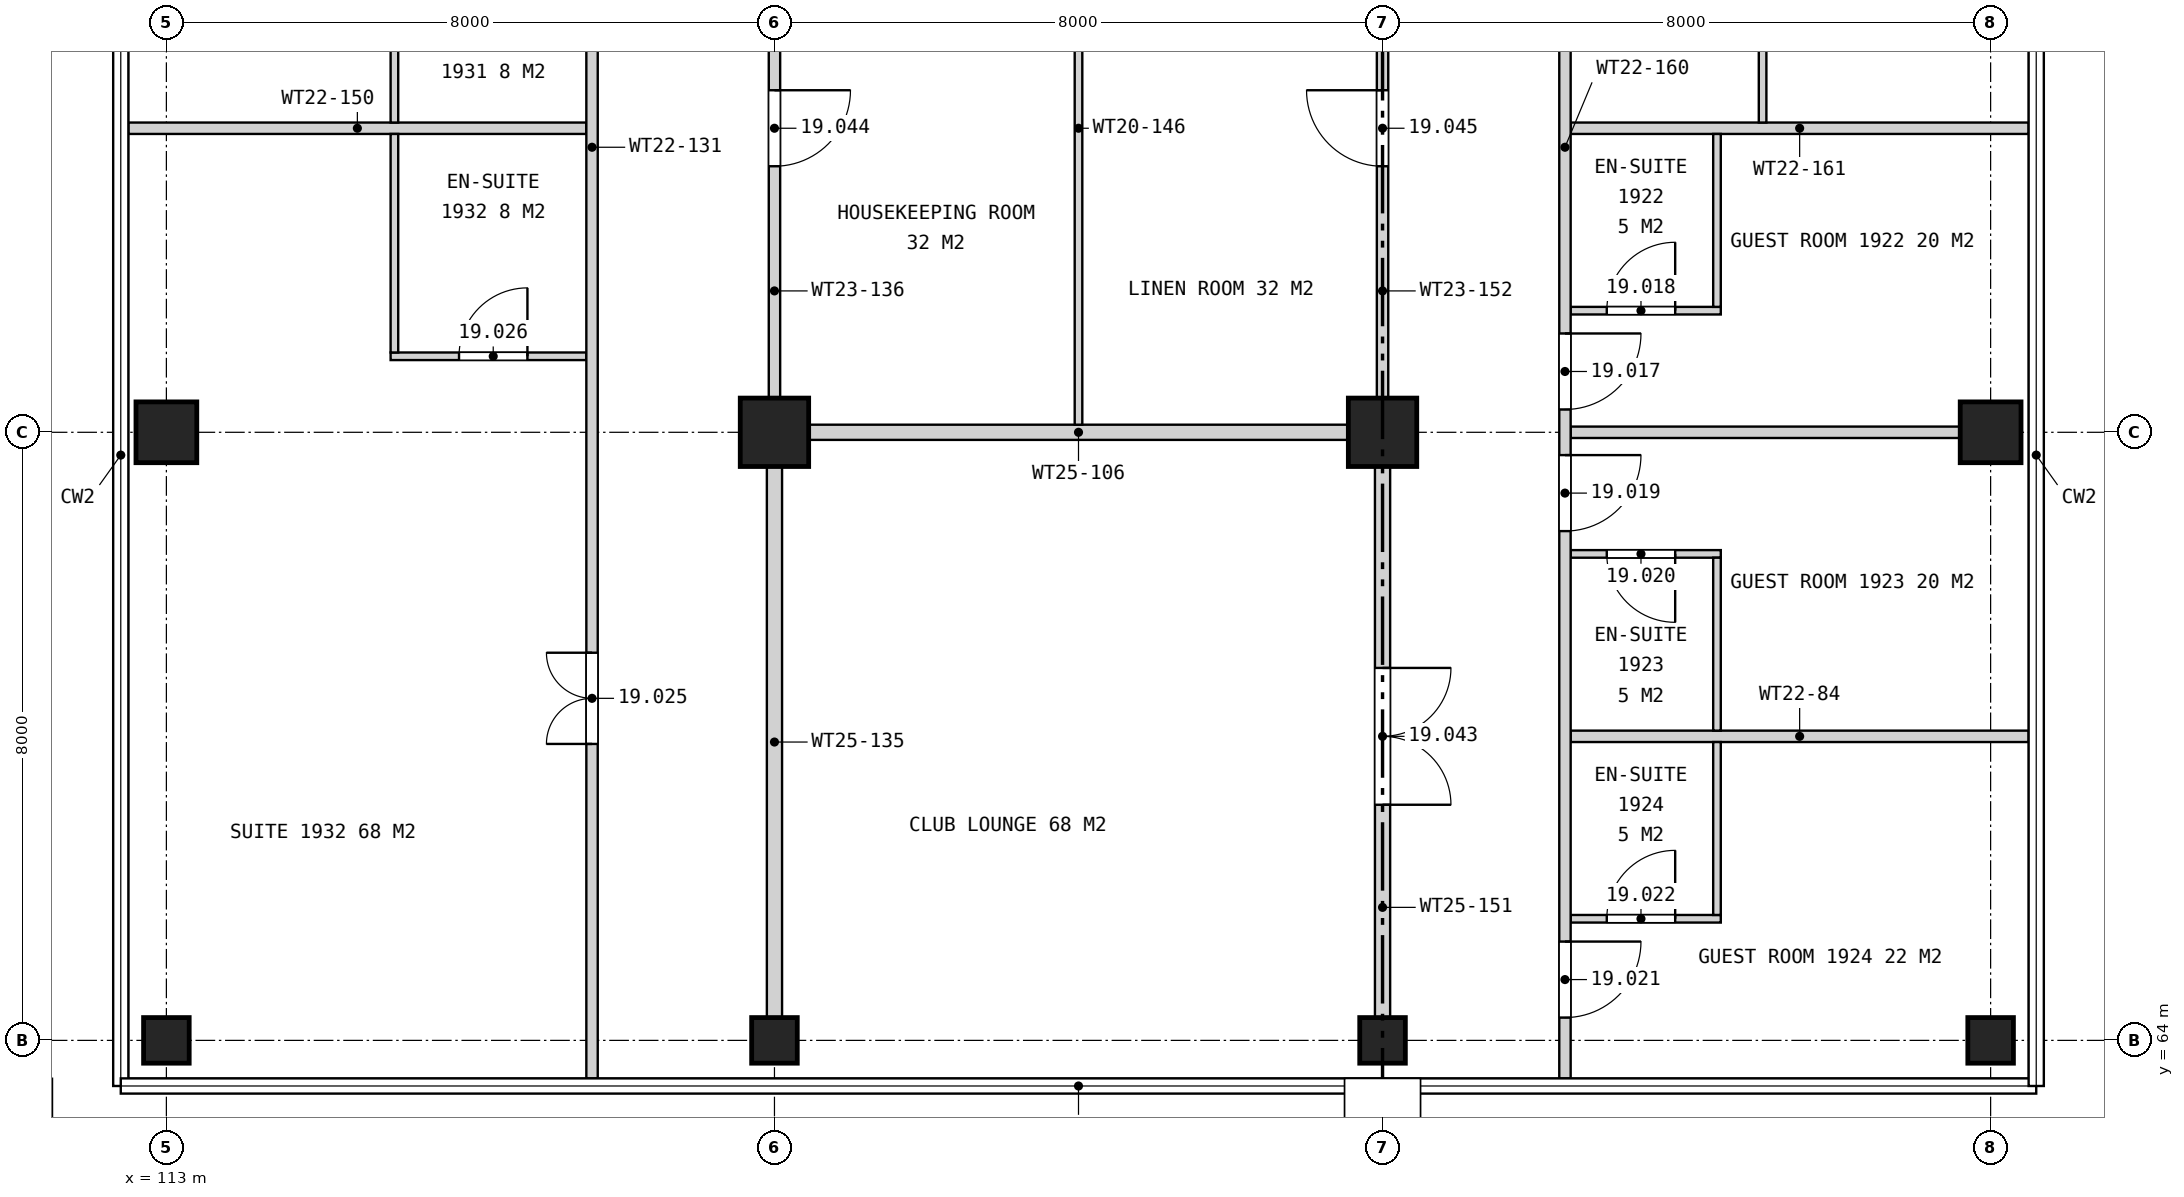
"""IFC4 building model, lengths in metres.
Left out: names, types, materials, properties, quantities, classifications, styles, units other than length and angle.
Written with IfcOpenShell. Run it as: python <this file> out.ifc"""

import sys

from ifc_helpers import new_model, si_unit, direction, frame, frame_2d, origin, origin_2d, place, context, subcontext, project, spatial, rectangle, extrude, element, fill, save


model = new_model("IFC4")
c1 = context("Model", 3, precision=1e-05, world=origin(), true_north=direction((0.0, 1.0)))
c2 = subcontext(c1, "Body", "Model", "MODEL_VIEW")
j1 = project(units=[si_unit("LENGTHUNIT", "METRE"), si_unit("PLANEANGLEUNIT", "RADIAN")], contexts=[c1])
p1 = place(None, origin())
s1 = spatial("IfcSite", under=j1, at=p1, CompositionType="ELEMENT")
p2 = place(p1, origin())
s2 = spatial("IfcBuilding", under=s1, at=p2, CompositionType="ELEMENT")
p3 = place(p2, frame((0.0, 0.0, 97.9)))
s3 = spatial("IfcBuildingStorey", under=s2, at=p3, CompositionType="ELEMENT", Elevation=97.9)
p4 = place(p3, frame((113.0, 64.0, 0.0), z_axis=(0.0, 0.0, 1.0), x_axis=(1.0, 0.0, 0.0)))
e1 = element("IfcColumn", 1, at=p4, inside=s3, PredefinedType="COLUMN", context=c2, shape_type="SweptSolid", body=[
    extrude(rectangle(XDim=0.6, YDim=0.6, at=origin_2d()), origin(), (0.0, 0.0, 1.0), 3.7),
])
p5 = place(p3, frame((113.0, 72.0, 0.0), z_axis=(0.0, 0.0, 1.0), x_axis=(1.0, 0.0, 0.0)))
e2 = element("IfcColumn", 2, at=p5, inside=s3, PredefinedType="COLUMN", context=c2, shape_type="SweptSolid", body=[
    extrude(rectangle(XDim=0.8, YDim=0.8, at=origin_2d()), origin(), (0.0, 0.0, 1.0), 3.7),
])
p6 = place(p3, frame((121.0, 64.0, 0.0), z_axis=(0.0, 0.0, 1.0), x_axis=(1.0, 0.0, 0.0)))
e3 = element("IfcColumn", 3, at=p6, inside=s3, PredefinedType="COLUMN", context=c2, shape_type="SweptSolid", body=[
    extrude(rectangle(XDim=0.6, YDim=0.6, at=origin_2d()), origin(), (0.0, 0.0, 1.0), 3.7),
])
p7 = place(p3, frame((121.0, 72.0, 0.0), z_axis=(0.0, 0.0, 1.0), x_axis=(1.0, 0.0, 0.0)))
e4 = element("IfcColumn", 4, at=p7, inside=s3, PredefinedType="COLUMN", context=c2, shape_type="SweptSolid", body=[
    extrude(rectangle(XDim=0.9, YDim=0.9, at=origin_2d()), origin(), (0.0, 0.0, 1.0), 3.7),
])
p8 = place(p3, frame((129.0, 64.0, 0.0), z_axis=(0.0, 0.0, 1.0), x_axis=(1.0, 0.0, 0.0)))
e5 = element("IfcColumn", 5, at=p8, inside=s3, PredefinedType="COLUMN", context=c2, shape_type="SweptSolid", body=[
    extrude(rectangle(XDim=0.6, YDim=0.6, at=origin_2d()), origin(), (0.0, 0.0, 1.0), 3.7),
])
p9 = place(p3, frame((129.0, 72.0, 0.0), z_axis=(0.0, 0.0, 1.0), x_axis=(1.0, 0.0, 0.0)))
e6 = element("IfcColumn", 6, at=p9, inside=s3, PredefinedType="COLUMN", context=c2, shape_type="SweptSolid", body=[
    extrude(rectangle(XDim=0.9, YDim=0.9, at=origin_2d()), origin(), (0.0, 0.0, 1.0), 3.7),
])
p10 = place(p3, frame((137.0, 64.0, 0.0), z_axis=(0.0, 0.0, 1.0), x_axis=(1.0, 0.0, 0.0)))
e7 = element("IfcColumn", 7, at=p10, inside=s3, PredefinedType="COLUMN", context=c2, shape_type="SweptSolid", body=[
    extrude(rectangle(XDim=0.6, YDim=0.6, at=origin_2d()), origin(), (0.0, 0.0, 1.0), 3.7),
])
p11 = place(p3, frame((137.0, 72.0, 0.0), z_axis=(0.0, 0.0, 1.0), x_axis=(1.0, 0.0, 0.0)))
e8 = element("IfcColumn", 8, at=p11, inside=s3, PredefinedType="COLUMN", context=c2, shape_type="SweptSolid", body=[
    extrude(rectangle(XDim=0.8, YDim=0.8, at=origin_2d()), origin(), (0.0, 0.0, 1.0), 3.7),
])
p12 = place(p3, frame((131.475, 65.6, 0.0), z_axis=(0.0, 0.0, 1.0), x_axis=(1.0, 0.0, 0.0)))
e9 = element("IfcWall", 9, at=p12, inside=s3, PredefinedType="PLUMBINGWALL", context=c2, shape_type="SweptSolid", body=[
    extrude(rectangle(XDim=1.975, YDim=0.1, at=frame_2d((0.987, 0.0))), origin(), (0.0, 0.0, 1.0), 3.7),
])
p13 = place(p12, frame((0.475, 0.0, 0.0)))
e10 = element("IfcOpeningElement", 10, at=p13, cuts=e9, PredefinedType="OPENING", context=c2, shape_type="SweptSolid", body=[
    extrude(rectangle(XDim=0.9, YDim=2.1, at=frame_2d((0.45, 1.05))), frame((0.0, 0.06, 0.0), z_axis=(0.0, -1.0, 0.0), x_axis=(1.0, 0.0, 0.0)), (0.0, 0.0, 1.0), 0.12),
])
p14 = place(p3, frame((131.475, 68.0, 0.0), z_axis=(0.0, 0.0, 1.0), x_axis=(1.0, 0.0, 0.0)))
e11 = element("IfcWall", 11, at=p14, inside=s3, PredefinedType="PARTITIONING", context=c2, shape_type="SweptSolid", body=[
    extrude(rectangle(XDim=6.025, YDim=0.15, at=frame_2d((3.012, 0.0))), origin(), (0.0, 0.0, 1.0), 2.963),
])
p15 = place(p3, frame((131.475, 70.4, 0.0), z_axis=(0.0, 0.0, 1.0), x_axis=(1.0, 0.0, 0.0)))
e12 = element("IfcWall", 12, at=p15, inside=s3, PredefinedType="PLUMBINGWALL", context=c2, shape_type="SweptSolid", body=[
    extrude(rectangle(XDim=1.975, YDim=0.1, at=frame_2d((0.987, 0.0))), origin(), (0.0, 0.0, 1.0), 3.7),
])
p16 = place(p15, frame((0.475, 0.0, 0.0)))
e13 = element("IfcOpeningElement", 13, at=p16, cuts=e12, PredefinedType="OPENING", context=c2, shape_type="SweptSolid", body=[
    extrude(rectangle(XDim=0.9, YDim=2.1, at=frame_2d((0.45, 1.05))), frame((0.0, 0.06, 0.0), z_axis=(0.0, -1.0, 0.0), x_axis=(1.0, 0.0, 0.0)), (0.0, 0.0, 1.0), 0.12),
])
p17 = place(p3, frame((121.45, 72.0, 0.0), z_axis=(0.0, 0.0, 1.0), x_axis=(1.0, 0.0, 0.0)))
e14 = element("IfcWall", 14, at=p17, inside=s3, PredefinedType="PARTITIONING", context=c2, shape_type="SweptSolid", body=[
    extrude(rectangle(XDim=7.1, YDim=0.2, at=frame_2d((3.55, 0.0))), origin(), (0.0, 0.0, 1.0), 2.96),
])
p18 = place(p3, frame((131.475, 72.0, 0.0), z_axis=(0.0, 0.0, 1.0), x_axis=(1.0, 0.0, 0.0)))
e15 = element("IfcWall", 15, at=p18, inside=s3, PredefinedType="PARTITIONING", context=c2, shape_type="SweptSolid", body=[
    extrude(rectangle(XDim=5.125, YDim=0.15, at=frame_2d((2.562, 0.0))), origin(), (0.0, 0.0, 1.0), 2.96),
])
p19 = place(p3, frame((115.95, 73.0, 0.0), z_axis=(0.0, 0.0, 1.0), x_axis=(1.0, 0.0, 0.0)))
e16 = element("IfcWall", 16, at=p19, inside=s3, PredefinedType="PLUMBINGWALL", context=c2, shape_type="SweptSolid", body=[
    extrude(rectangle(XDim=2.575, YDim=0.1, at=frame_2d((1.288, 0.0))), origin(), (0.0, 0.0, 1.0), 3.7),
])
p20 = place(p19, frame((0.9, 0.0, 0.0)))
e17 = element("IfcOpeningElement", 17, at=p20, cuts=e16, PredefinedType="OPENING", context=c2, shape_type="SweptSolid", body=[
    extrude(rectangle(XDim=0.9, YDim=2.1, at=frame_2d((0.45, 1.05))), frame((0.0, 0.06, 0.0), z_axis=(0.0, -1.0, 0.0), x_axis=(1.0, 0.0, 0.0)), (0.0, 0.0, 1.0), 0.12),
])
p21 = place(p3, frame((131.475, 73.6, 0.0), z_axis=(0.0, 0.0, 1.0), x_axis=(1.0, 0.0, 0.0)))
e18 = element("IfcWall", 18, at=p21, inside=s3, PredefinedType="PLUMBINGWALL", context=c2, shape_type="SweptSolid", body=[
    extrude(rectangle(XDim=1.975, YDim=0.1, at=frame_2d((0.987, 0.0))), origin(), (0.0, 0.0, 1.0), 3.7),
])
p22 = place(p21, frame((0.475, 0.0, 0.0)))
e19 = element("IfcOpeningElement", 19, at=p22, cuts=e18, PredefinedType="OPENING", context=c2, shape_type="SweptSolid", body=[
    extrude(rectangle(XDim=0.9, YDim=2.1, at=frame_2d((0.45, 1.05))), frame((0.0, 0.06, 0.0), z_axis=(0.0, -1.0, 0.0), x_axis=(1.0, 0.0, 0.0)), (0.0, 0.0, 1.0), 0.12),
])
for number, where, z_axis, x_axis in (
    (20, (112.5, 76.0, 0.0), (0.0, 0.0, 1.0), (1.0, 0.0, 0.0)),
    (21, (131.475, 76.0, 0.0), (0.0, 0.0, 1.0), (1.0, 0.0, 0.0)),
):
    element("IfcWall", number, at=place(p3, frame(where, z_axis=z_axis, x_axis=x_axis)), inside=s3, PredefinedType="PARTITIONING", context=c2, shape_type="SweptSolid", body=[
        extrude(rectangle(XDim=6.025, YDim=0.15, at=frame_2d((3.012, 0.0))), origin(), (0.0, 0.0, 1.0), 2.963),
    ])
for number, where, z_axis, x_axis in (
    (22, (116.0, 73.05, 0.0), (0.0, 0.0, 1.0), (0.0, 1.0, 0.0)),
    (23, (116.0, 76.075, 0.0), (0.0, 0.0, 1.0), (0.0, 1.0, 0.0)),
):
    element("IfcWall", number, at=place(p3, frame(where, z_axis=z_axis, x_axis=x_axis)), inside=s3, PredefinedType="PLUMBINGWALL", context=c2, shape_type="SweptSolid", body=[
        extrude(rectangle(XDim=2.875, YDim=0.1, at=frame_2d((1.438, 0.0))), origin(), (0.0, 0.0, 1.0), 3.7),
    ])
p23 = place(p3, frame((118.6, 63.5, 0.0), z_axis=(0.0, 0.0, 1.0), x_axis=(0.0, 1.0, 0.0)))
e24 = element("IfcWall", 24, at=p23, inside=s3, PredefinedType="PARTITIONING", context=c2, shape_type="SweptSolid", body=[
    extrude(rectangle(XDim=24.5, YDim=0.15, at=frame_2d((12.25, 0.0))), origin(), (0.0, 0.0, 1.0), 2.957),
])
p24 = place(p23, frame((19.4, 0.0, 0.0)))
e25 = element("IfcOpeningElement", 25, at=p24, cuts=e24, PredefinedType="OPENING", context=c2, shape_type="SweptSolid", body=[
    extrude(rectangle(XDim=1.2, YDim=2.2, at=frame_2d((0.6, 1.1))), frame((0.0, 0.085, 0.0), z_axis=(0.0, -1.0, 0.0), x_axis=(1.0, 0.0, 0.0)), (0.0, 0.0, 1.0), 0.17),
])
p25 = place(p23, frame((4.4, 0.0, 0.0)))
e26 = element("IfcOpeningElement", 26, at=p25, cuts=e24, PredefinedType="OPENING", context=c2, shape_type="SweptSolid", body=[
    extrude(rectangle(XDim=1.2, YDim=2.2, at=frame_2d((0.6, 1.1))), frame((0.0, 0.085, 0.0), z_axis=(0.0, -1.0, 0.0), x_axis=(1.0, 0.0, 0.0)), (0.0, 0.0, 1.0), 0.17),
])
p26 = place(p3, frame((121.0, 64.3, 0.0), z_axis=(0.0, 0.0, 1.0), x_axis=(0.0, 1.0, 0.0)))
e27 = element("IfcWall", 27, at=p26, inside=s3, PredefinedType="PARTITIONING", context=c2, shape_type="SweptSolid", body=[
    extrude(rectangle(XDim=7.25, YDim=0.2, at=frame_2d((3.625, 0.0))), origin(), (0.0, 0.0, 1.0), 2.96),
])
p27 = place(p3, frame((121.0, 72.45, 0.0), z_axis=(0.0, 0.0, 1.0), x_axis=(0.0, 1.0, 0.0)))
e28 = element("IfcWall", 28, at=p27, inside=s3, PredefinedType="PARTITIONING", context=c2, shape_type="SweptSolid", body=[
    extrude(rectangle(XDim=7.05, YDim=0.15, at=frame_2d((3.525, 0.0))), origin(), (0.0, 0.0, 1.0), 2.96),
])
p28 = place(p27, frame((3.05, 0.0, 0.0)))
e29 = element("IfcOpeningElement", 29, at=p28, cuts=e28, PredefinedType="OPENING", context=c2, shape_type="SweptSolid", body=[
    extrude(rectangle(XDim=1.0, YDim=2.1, at=frame_2d((0.5, 1.05))), frame((0.0, 0.085, 0.0), z_axis=(0.0, -1.0, 0.0), x_axis=(1.0, 0.0, 0.0)), (0.0, 0.0, 1.0), 0.17),
])
p29 = place(p3, frame((125.0, 72.1, 0.0), z_axis=(0.0, 0.0, 1.0), x_axis=(0.0, 1.0, 0.0)))
e30 = element("IfcWall", 30, at=p29, inside=s3, PredefinedType="PARTITIONING", context=c2, shape_type="SweptSolid", body=[
    extrude(rectangle(XDim=7.8, YDim=0.1, at=frame_2d((3.9, 0.0))), origin(), (0.0, 0.0, 1.0), 3.014),
])
p30 = place(p3, frame((129.0, 64.3, 0.0), z_axis=(0.0, 0.0, 1.0), x_axis=(0.0, 1.0, 0.0)))
e31 = element("IfcWall", 31, at=p30, inside=s3, PredefinedType="PARTITIONING", context=c2, shape_type="SweptSolid", body=[
    extrude(rectangle(XDim=7.25, YDim=0.2, at=frame_2d((3.625, 0.0))), origin(), (0.0, 0.0, 1.0), 2.96),
])
p31 = place(p30, frame((2.8, 0.0, 0.0)))
e32 = element("IfcOpeningElement", 32, at=p31, cuts=e31, PredefinedType="OPENING", context=c2, shape_type="SweptSolid", body=[
    extrude(rectangle(XDim=1.8, YDim=2.4, at=frame_2d((0.9, 1.2))), frame((0.0, 0.11, 0.0), z_axis=(0.0, -1.0, 0.0), x_axis=(1.0, 0.0, 0.0)), (0.0, 0.0, 1.0), 0.22),
])
p32 = place(p3, frame((129.0, 72.45, 0.0), z_axis=(0.0, 0.0, 1.0), x_axis=(0.0, 1.0, 0.0)))
e33 = element("IfcWall", 33, at=p32, inside=s3, PredefinedType="PARTITIONING", context=c2, shape_type="SweptSolid", body=[
    extrude(rectangle(XDim=7.05, YDim=0.15, at=frame_2d((3.525, 0.0))), origin(), (0.0, 0.0, 1.0), 2.96),
])
p33 = place(p32, frame((3.05, 0.0, 0.0)))
e34 = element("IfcOpeningElement", 34, at=p33, cuts=e33, PredefinedType="OPENING", context=c2, shape_type="SweptSolid", body=[
    extrude(rectangle(XDim=1.0, YDim=2.1, at=frame_2d((0.5, 1.05))), frame((0.0, 0.085, 0.0), z_axis=(0.0, -1.0, 0.0), x_axis=(1.0, 0.0, 0.0)), (0.0, 0.0, 1.0), 0.17),
])
p34 = place(p3, frame((131.4, 63.5, 0.0), z_axis=(0.0, 0.0, 1.0), x_axis=(0.0, 1.0, 0.0)))
e35 = element("IfcWall", 35, at=p34, inside=s3, PredefinedType="PARTITIONING", context=c2, shape_type="SweptSolid", body=[
    extrude(rectangle(XDim=24.5, YDim=0.15, at=frame_2d((12.25, 0.0))), origin(), (0.0, 0.0, 1.0), 2.957),
])
p35 = place(p34, frame((19.4, 0.0, 0.0)))
e36 = element("IfcOpeningElement", 36, at=p35, cuts=e35, PredefinedType="OPENING", context=c2, shape_type="SweptSolid", body=[
    extrude(rectangle(XDim=1.2, YDim=2.2, at=frame_2d((0.6, 1.1))), frame((0.0, 0.085, 0.0), z_axis=(0.0, -1.0, 0.0), x_axis=(1.0, 0.0, 0.0)), (0.0, 0.0, 1.0), 0.17),
])
p36 = place(p34, frame((8.8, 0.0, 0.0)))
e37 = element("IfcOpeningElement", 37, at=p36, cuts=e35, PredefinedType="OPENING", context=c2, shape_type="SweptSolid", body=[
    extrude(rectangle(XDim=1.0, YDim=2.1, at=frame_2d((0.5, 1.05))), frame((0.0, 0.085, 0.0), z_axis=(0.0, -1.0, 0.0), x_axis=(1.0, 0.0, 0.0)), (0.0, 0.0, 1.0), 0.17),
])
p37 = place(p34, frame((7.2, 0.0, 0.0)))
e38 = element("IfcOpeningElement", 38, at=p37, cuts=e35, PredefinedType="OPENING", context=c2, shape_type="SweptSolid", body=[
    extrude(rectangle(XDim=1.0, YDim=2.1, at=frame_2d((0.5, 1.05))), frame((0.0, 0.085, 0.0), z_axis=(0.0, -1.0, 0.0), x_axis=(1.0, 0.0, 0.0)), (0.0, 0.0, 1.0), 0.17),
])
p38 = place(p34, frame((0.8, 0.0, 0.0)))
e39 = element("IfcOpeningElement", 39, at=p38, cuts=e35, PredefinedType="OPENING", context=c2, shape_type="SweptSolid", body=[
    extrude(rectangle(XDim=1.0, YDim=2.1, at=frame_2d((0.5, 1.05))), frame((0.0, 0.085, 0.0), z_axis=(0.0, -1.0, 0.0), x_axis=(1.0, 0.0, 0.0)), (0.0, 0.0, 1.0), 0.17),
])
for number, where, z_axis, x_axis in (
    (40, (133.4, 65.65, 0.0), (0.0, 0.0, 1.0), (0.0, 1.0, 0.0)),
    (41, (133.4, 68.075, 0.0), (0.0, 0.0, 1.0), (0.0, 1.0, 0.0)),
    (42, (133.4, 73.65, 0.0), (0.0, 0.0, 1.0), (0.0, 1.0, 0.0)),
):
    element("IfcWall", number, at=place(p3, frame(where, z_axis=z_axis, x_axis=x_axis)), inside=s3, PredefinedType="PLUMBINGWALL", context=c2, shape_type="SweptSolid", body=[
        extrude(rectangle(XDim=2.275, YDim=0.1, at=frame_2d((1.138, 0.0))), origin(), (0.0, 0.0, 1.0), 3.7),
    ])
p39 = place(p3, frame((134.0, 76.075, 0.0), z_axis=(0.0, 0.0, 1.0), x_axis=(0.0, 1.0, 0.0)))
e43 = element("IfcWall", 43, at=p39, inside=s3, PredefinedType="PLUMBINGWALL", context=c2, shape_type="SweptSolid", body=[
    extrude(rectangle(XDim=2.875, YDim=0.1, at=frame_2d((1.438, 0.0))), origin(), (0.0, 0.0, 1.0), 3.7),
])
p40 = place(p36, frame((1.0, 0.0, 0.0), z_axis=(0.0, 0.0, 1.0), x_axis=(-1.0, 0.0, 0.0)))
e44 = element("IfcDoor", 44, at=p40, inside=s3, OperationType="SINGLE_SWING_LEFT", PredefinedType="DOOR", context=c2, shape_type="SweptSolid", body=[
    extrude(rectangle(XDim=1.0, YDim=2.1, at=frame_2d((0.5, 1.05))), frame((0.0, 0.025, 0.0), z_axis=(0.0, -1.0, 0.0), x_axis=(1.0, 0.0, 0.0)), (0.0, 0.0, 1.0), 0.05),
])
fill(e37, e44)
p41 = place(p22, origin())
e45 = element("IfcDoor", 45, at=p41, inside=s3, OperationType="SINGLE_SWING_RIGHT", PredefinedType="DOOR", context=c2, shape_type="SweptSolid", body=[
    extrude(rectangle(XDim=0.9, YDim=2.1, at=frame_2d((0.45, 1.05))), frame((0.0, 0.025, 0.0), z_axis=(0.0, -1.0, 0.0), x_axis=(1.0, 0.0, 0.0)), (0.0, 0.0, 1.0), 0.05),
])
fill(e19, e45)
p42 = place(p37, frame((1.0, 0.0, 0.0), z_axis=(0.0, 0.0, 1.0), x_axis=(-1.0, 0.0, 0.0)))
e46 = element("IfcDoor", 46, at=p42, inside=s3, OperationType="SINGLE_SWING_LEFT", PredefinedType="DOOR", context=c2, shape_type="SweptSolid", body=[
    extrude(rectangle(XDim=1.0, YDim=2.1, at=frame_2d((0.5, 1.05))), frame((0.0, 0.025, 0.0), z_axis=(0.0, -1.0, 0.0), x_axis=(1.0, 0.0, 0.0)), (0.0, 0.0, 1.0), 0.05),
])
fill(e38, e46)
p43 = place(p16, frame((0.9, 0.0, 0.0), z_axis=(0.0, 0.0, 1.0), x_axis=(-1.0, 0.0, 0.0)))
e47 = element("IfcDoor", 47, at=p43, inside=s3, OperationType="SINGLE_SWING_LEFT", PredefinedType="DOOR", context=c2, shape_type="SweptSolid", body=[
    extrude(rectangle(XDim=0.9, YDim=2.1, at=frame_2d((0.45, 1.05))), frame((0.0, 0.025, 0.0), z_axis=(0.0, -1.0, 0.0), x_axis=(1.0, 0.0, 0.0)), (0.0, 0.0, 1.0), 0.05),
])
fill(e13, e47)
p44 = place(p38, frame((1.0, 0.0, 0.0), z_axis=(0.0, 0.0, 1.0), x_axis=(-1.0, 0.0, 0.0)))
e48 = element("IfcDoor", 48, at=p44, inside=s3, OperationType="SINGLE_SWING_LEFT", PredefinedType="DOOR", context=c2, shape_type="SweptSolid", body=[
    extrude(rectangle(XDim=1.0, YDim=2.1, at=frame_2d((0.5, 1.05))), frame((0.0, 0.025, 0.0), z_axis=(0.0, -1.0, 0.0), x_axis=(1.0, 0.0, 0.0)), (0.0, 0.0, 1.0), 0.05),
])
fill(e39, e48)
p45 = place(p13, origin())
e49 = element("IfcDoor", 49, at=p45, inside=s3, OperationType="SINGLE_SWING_RIGHT", PredefinedType="DOOR", context=c2, shape_type="SweptSolid", body=[
    extrude(rectangle(XDim=0.9, YDim=2.1, at=frame_2d((0.45, 1.05))), frame((0.0, 0.025, 0.0), z_axis=(0.0, -1.0, 0.0), x_axis=(1.0, 0.0, 0.0)), (0.0, 0.0, 1.0), 0.05),
])
fill(e10, e49)
p46 = place(p25, origin())
e50 = element("IfcDoor", 50, at=p46, inside=s3, OperationType="DOUBLE_DOOR_SINGLE_SWING", PredefinedType="DOOR", context=c2, shape_type="SweptSolid", body=[
    extrude(rectangle(XDim=1.2, YDim=2.2, at=frame_2d((0.6, 1.1))), frame((0.0, 0.025, 0.0), z_axis=(0.0, -1.0, 0.0), x_axis=(1.0, 0.0, 0.0)), (0.0, 0.0, 1.0), 0.05),
])
fill(e26, e50)
p47 = place(p20, origin())
e51 = element("IfcDoor", 51, at=p47, inside=s3, OperationType="SINGLE_SWING_RIGHT", PredefinedType="DOOR", context=c2, shape_type="SweptSolid", body=[
    extrude(rectangle(XDim=0.9, YDim=2.1, at=frame_2d((0.45, 1.05))), frame((0.0, 0.025, 0.0), z_axis=(0.0, -1.0, 0.0), x_axis=(1.0, 0.0, 0.0)), (0.0, 0.0, 1.0), 0.05),
])
fill(e17, e51)
p48 = place(p31, frame((1.8, 0.0, 0.0), z_axis=(0.0, 0.0, 1.0), x_axis=(-1.0, 0.0, 0.0)))
e52 = element("IfcDoor", 52, at=p48, inside=s3, OperationType="DOUBLE_DOOR_SINGLE_SWING", PredefinedType="DOOR", context=c2, shape_type="SweptSolid", body=[
    extrude(rectangle(XDim=1.8, YDim=2.4, at=frame_2d((0.9, 1.2))), frame((0.0, 0.025, 0.0), z_axis=(0.0, -1.0, 0.0), x_axis=(1.0, 0.0, 0.0)), (0.0, 0.0, 1.0), 0.05),
])
fill(e32, e52)
p49 = place(p28, frame((1.0, 0.0, 0.0), z_axis=(0.0, 0.0, 1.0), x_axis=(-1.0, 0.0, 0.0)))
e53 = element("IfcDoor", 53, at=p49, inside=s3, OperationType="SINGLE_SWING_LEFT", PredefinedType="DOOR", context=c2, shape_type="SweptSolid", body=[
    extrude(rectangle(XDim=1.0, YDim=2.1, at=frame_2d((0.5, 1.05))), frame((0.0, 0.025, 0.0), z_axis=(0.0, -1.0, 0.0), x_axis=(1.0, 0.0, 0.0)), (0.0, 0.0, 1.0), 0.05),
])
fill(e29, e53)
p50 = place(p33, origin())
e54 = element("IfcDoor", 54, at=p50, inside=s3, OperationType="SINGLE_SWING_RIGHT", PredefinedType="DOOR", context=c2, shape_type="SweptSolid", body=[
    extrude(rectangle(XDim=1.0, YDim=2.1, at=frame_2d((0.5, 1.05))), frame((0.0, 0.025, 0.0), z_axis=(0.0, -1.0, 0.0), x_axis=(1.0, 0.0, 0.0)), (0.0, 0.0, 1.0), 0.05),
])
fill(e34, e54)
save(model, sys.argv[1])
